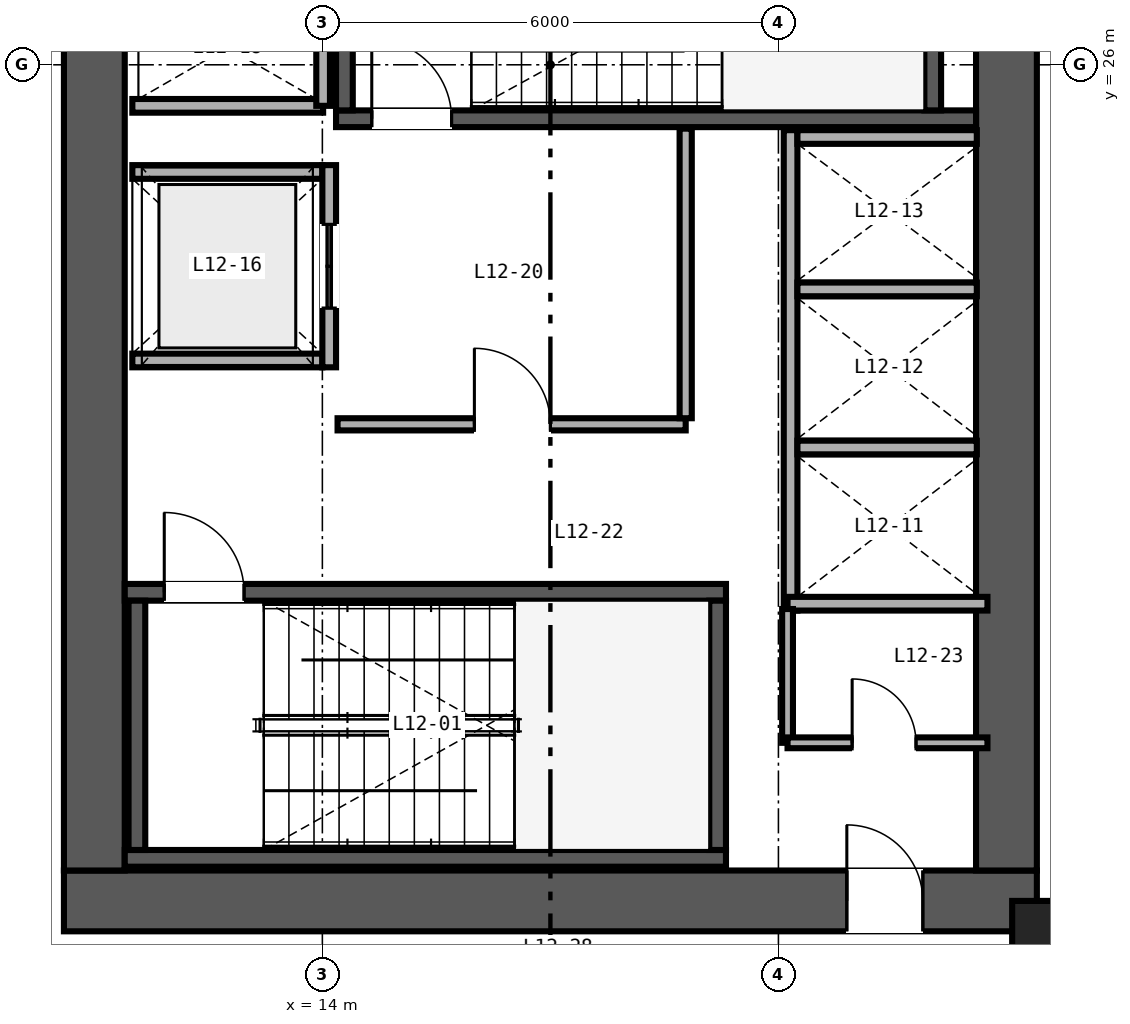
"""IFC4 building model, lengths in metres.
Left out: names, types, materials, properties, quantities, classifications, styles, units other than length and angle.
Written with IfcOpenShell. Run it as: python <this file> out.ifc"""

import sys

from ifc_helpers import new_model, si_unit, direction, frame, frame_2d, origin, origin_2d, place, context, subcontext, project, spatial, rectangle, hollow_rectangle, extrude, source, transform, mapped, element, fill, save


model = new_model("IFC4")
c1 = context("Model", 3, precision=1e-05, world=origin(), true_north=direction((0.0, 1.0)))
c2 = subcontext(c1, "Body", "Model", "MODEL_VIEW")
j1 = project(units=[si_unit("LENGTHUNIT", "METRE"), si_unit("PLANEANGLEUNIT", "RADIAN")], contexts=[c1])
p1 = place(None, origin())
s1 = spatial("IfcSite", under=j1, at=p1, CompositionType="ELEMENT")
p2 = place(p1, origin())
s2 = spatial("IfcBuilding", under=s1, at=p2, CompositionType="ELEMENT")
p3 = place(p2, frame((0.0, 0.0, 52.8)))
s3 = spatial("IfcBuildingStorey", under=s2, at=p3, CompositionType="ELEMENT", Elevation=52.8)
p4 = place(p3, frame((10.6, 15.0, 0.0), z_axis=(0.0, 0.0, 1.0), x_axis=(1.0, 0.0, 0.0)))
e1 = element("IfcWall", 1, at=p4, inside=s3, PredefinedType="SHEAR", context=c2, shape_type="SweptSolid", body=[
    extrude(rectangle(XDim=12.8, YDim=0.8, at=frame_2d((6.4, 0.0))), origin(), (0.0, 0.0, 1.0), 3.35),
])
p5 = place(p4, frame((10.3, 0.0, 0.0)))
e2 = element("IfcOpeningElement", 2, at=p5, cuts=e1, PredefinedType="OPENING", context=c2, shape_type="SweptSolid", body=[
    extrude(rectangle(XDim=1.0, YDim=2.15, at=frame_2d((0.5, 1.075))), frame((0.0, 0.41, 0.0), z_axis=(0.0, -1.0, 0.0), x_axis=(1.0, 0.0, 0.0)), (0.0, 0.0, 1.0), 0.82),
])
for number, where, z_axis, x_axis in (
    (3, (11.0, 15.4, 0.0), (0.0, 0.0, 1.0), (0.0, 1.0, 0.0)),
    (4, (23.0, 15.4, 0.0), (0.0, 0.0, 1.0), (0.0, 1.0, 0.0)),
):
    element("IfcWall", number, at=place(p3, frame(where, z_axis=z_axis, x_axis=x_axis)), inside=s3, PredefinedType="SHEAR", context=c2, shape_type="SweptSolid", body=[
        extrude(rectangle(XDim=21.2, YDim=0.8, at=frame_2d((10.6, 0.0))), origin(), (0.0, 0.0, 1.0), 3.35),
    ])
p6 = place(p3, frame((11.4, 15.56, 0.0), z_axis=(0.0, 0.0, 1.0), x_axis=(1.0, 0.0, 0.0)))
e5 = element("IfcWall", 5, at=p6, inside=s3, PredefinedType="SHEAR", context=c2, shape_type="SweptSolid", body=[
    extrude(rectangle(XDim=7.91, YDim=0.22, at=frame_2d((3.955, 0.0))), origin(), (0.0, 0.0, 1.0), 3.4),
])
p7 = place(p3, frame((11.4, 19.06, 0.0), z_axis=(0.0, 0.0, 1.0), x_axis=(1.0, 0.0, 0.0)))
e6 = element("IfcWall", 6, at=p7, inside=s3, PredefinedType="SHEAR", context=c2, shape_type="SweptSolid", body=[
    extrude(rectangle(XDim=7.91, YDim=0.22, at=frame_2d((3.955, 0.0))), origin(), (0.0, 0.0, 1.0), 3.4),
])
p8 = place(p7, frame((0.52, 0.0, 0.0)))
e7 = element("IfcOpeningElement", 7, at=p8, cuts=e6, PredefinedType="OPENING", context=c2, shape_type="SweptSolid", body=[
    extrude(rectangle(XDim=1.05, YDim=2.15, at=frame_2d((0.525, 1.075))), frame((0.0, 0.12, 0.0), z_axis=(0.0, -1.0, 0.0), x_axis=(1.0, 0.0, 0.0)), (0.0, 0.0, 1.0), 0.24),
])
for number, where, z_axis, x_axis in (
    (8, (11.56, 15.67, 0.0), (0.0, 0.0, 1.0), (0.0, 1.0, 0.0)),
    (9, (19.2, 15.67, 0.0), (0.0, 0.0, 1.0), (0.0, 1.0, 0.0)),
):
    element("IfcWall", number, at=place(p3, frame(where, z_axis=z_axis, x_axis=x_axis)), inside=s3, PredefinedType="SHEAR", context=c2, shape_type="SweptSolid", body=[
        extrude(rectangle(XDim=3.28, YDim=0.22, at=frame_2d((1.64, 0.0))), origin(), (0.0, 0.0, 1.0), 3.4),
    ])
p9 = place(p3, frame((14.18, 25.29, 0.0), z_axis=(0.0, 0.0, 1.0), x_axis=(1.0, 0.0, 0.0)))
e10 = element("IfcWall", 10, at=p9, inside=s3, PredefinedType="SHEAR", context=c2, shape_type="SweptSolid", body=[
    extrude(rectangle(XDim=8.42, YDim=0.22, at=frame_2d((4.21, 0.0))), origin(), (0.0, 0.0, 1.0), 3.4),
])
p10 = place(p9, frame((0.47, 0.0, 0.0)))
e11 = element("IfcOpeningElement", 11, at=p10, cuts=e10, PredefinedType="OPENING", context=c2, shape_type="SweptSolid", body=[
    extrude(rectangle(XDim=1.05, YDim=2.15, at=frame_2d((0.525, 1.075))), frame((0.0, 0.12, 0.0), z_axis=(0.0, -1.0, 0.0), x_axis=(1.0, 0.0, 0.0)), (0.0, 0.0, 1.0), 0.24),
])
for number, where, z_axis, x_axis in (
    (12, (14.29, 25.4, 0.0), (0.0, 0.0, 1.0), (0.0, 1.0, 0.0)),
    (13, (22.03, 25.4, 0.0), (0.0, 0.0, 1.0), (0.0, 1.0, 0.0)),
):
    element("IfcWall", number, at=place(p3, frame(where, z_axis=z_axis, x_axis=x_axis)), inside=s3, PredefinedType="SHEAR", context=c2, shape_type="SweptSolid", body=[
        extrude(rectangle(XDim=3.28, YDim=0.22, at=frame_2d((1.64, 0.0))), origin(), (0.0, 0.0, 1.0), 3.4),
    ])
m1 = source(origin(), c2, "Body", "SweptSolid", [
    extrude(hollow_rectangle(XDim=0.85, YDim=0.9, WallThickness=0.04, at=origin_2d()), origin(), (0.0, 0.0, 1.0), 3.35),
])
p11 = place(p3, frame((23.5, 14.55, 0.0), z_axis=(0.0, 0.0, 1.0), x_axis=(1.0, 0.0, 0.0)))
e14 = element("IfcColumn", 14, at=p11, inside=s3, PredefinedType="COLUMN", context=c2, shape_type="MappedRepresentation", body=[
    mapped(m1, transform((0.0, 0.0, 0.0), scale=1.0)),
])
p12 = place(p3, frame((20.16, 18.82, 0.0), z_axis=(0.0, 0.0, 1.0), x_axis=(0.0, 1.0, 0.0)))
e15 = element("IfcWall", 15, at=p12, inside=s3, PredefinedType="SOLIDWALL", context=c2, shape_type="SweptSolid", body=[
    extrude(rectangle(XDim=6.32, YDim=0.18, at=frame_2d((3.16, 0.0))), origin(), (0.0, 0.0, 1.0), 2.36),
])
p13 = place(p3, frame((20.12, 18.91, 0.0), z_axis=(0.0, 0.0, 1.0), x_axis=(1.0, 0.0, 0.0)))
e16 = element("IfcWall", 16, at=p13, inside=s3, PredefinedType="SOLIDWALL", context=c2, shape_type="SweptSolid", body=[
    extrude(rectangle(XDim=2.63, YDim=0.18, at=frame_2d((1.315, 0.0))), origin(), (0.0, 0.0, 1.0), 3.35),
])
p14 = place(p3, frame((20.25, 25.05, 0.0), z_axis=(0.0, 0.0, 1.0), x_axis=(1.0, 0.0, 0.0)))
e17 = element("IfcWall", 17, at=p14, inside=s3, PredefinedType="SOLIDWALL", context=c2, shape_type="SweptSolid", body=[
    extrude(rectangle(XDim=2.36, YDim=0.18, at=frame_2d((1.18, 0.0))), origin(), (0.0, 0.0, 1.0), 3.35),
])
p15 = place(p3, frame((20.25, 20.965, 0.0), z_axis=(0.0, 0.0, 1.0), x_axis=(1.0, 0.0, 0.0)))
e18 = element("IfcWall", 18, at=p15, inside=s3, PredefinedType="SOLIDWALL", context=c2, shape_type="SweptSolid", body=[
    extrude(rectangle(XDim=2.36, YDim=0.18, at=frame_2d((1.18, 0.0))), origin(), (0.0, 0.0, 1.0), 2.36),
])
p16 = place(p3, frame((20.25, 23.045, 0.0), z_axis=(0.0, 0.0, 1.0), x_axis=(1.0, 0.0, 0.0)))
e19 = element("IfcWall", 19, at=p16, inside=s3, PredefinedType="SOLIDWALL", context=c2, shape_type="SweptSolid", body=[
    extrude(rectangle(XDim=2.36, YDim=0.18, at=frame_2d((1.18, 0.0))), origin(), (0.0, 0.0, 1.0), 3.35),
])
for number, where, z_axis, x_axis in (
    (20, (11.5, 22.11, 0.0), (0.0, 0.0, 1.0), (1.0, 0.0, 0.0)),
    (21, (11.5, 24.59, 0.0), (0.0, 0.0, 1.0), (1.0, 0.0, 0.0)),
):
    element("IfcWall", number, at=place(p3, frame(where, z_axis=z_axis, x_axis=x_axis)), inside=s3, PredefinedType="SOLIDWALL", context=c2, shape_type="SweptSolid", body=[
        extrude(rectangle(XDim=2.5, YDim=0.18, at=frame_2d((1.25, 0.0))), origin(), (0.0, 0.0, 1.0), 3.35),
    ])
p17 = place(p3, frame((14.09, 22.02, 0.0), z_axis=(0.0, 0.0, 1.0), x_axis=(0.0, 1.0, 0.0)))
e22 = element("IfcWall", 22, at=p17, inside=s3, PredefinedType="SOLIDWALL", context=c2, shape_type="SweptSolid", body=[
    extrude(rectangle(XDim=2.66, YDim=0.18, at=frame_2d((1.33, 0.0))), origin(), (0.0, 0.0, 1.0), 3.35),
])
p18 = place(p17, frame((0.78, 0.0, 0.0)))
e23 = element("IfcOpeningElement", 23, at=p18, cuts=e22, PredefinedType="OPENING", context=c2, shape_type="SweptSolid", body=[
    extrude(rectangle(XDim=1.1, YDim=2.2, at=frame_2d((0.55, 1.1))), frame((0.0, 0.1, 0.0), z_axis=(0.0, -1.0, 0.0), x_axis=(1.0, 0.0, 0.0)), (0.0, 0.0, 1.0), 0.2),
])
p19 = place(p3, frame((11.5, 25.46, 0.0), z_axis=(0.0, 0.0, 1.0), x_axis=(1.0, 0.0, 0.0)))
e24 = element("IfcWall", 24, at=p19, inside=s3, PredefinedType="SOLIDWALL", context=c2, shape_type="SweptSolid", body=[
    extrude(rectangle(XDim=2.51, YDim=0.18, at=frame_2d((1.255, 0.0))), origin(), (0.0, 0.0, 1.0), 3.35),
])
p20 = place(p3, frame((14.01, 25.46, 0.0), z_axis=(0.0, 0.0, 1.0), x_axis=(0.0, 1.0, 0.0)))
e25 = element("IfcWall", 25, at=p20, inside=s3, PredefinedType="SOLIDWALL", context=c2, shape_type="SweptSolid", body=[
    extrude(rectangle(XDim=3.08, YDim=0.18, at=frame_2d((1.54, 0.0))), origin(), (0.0, 0.0, 1.0), 3.35),
])
p21 = place(p3, frame((14.2, 21.27, 0.0), z_axis=(0.0, 0.0, 1.0), x_axis=(1.0, 0.0, 0.0)))
e26 = element("IfcWall", 26, at=p21, inside=s3, PredefinedType="PARTITIONING", context=c2, shape_type="SweptSolid", body=[
    extrude(rectangle(XDim=4.58, YDim=0.16, at=frame_2d((2.29, 0.0))), origin(), (0.0, 0.0, 1.0), 3.35),
])
p22 = place(p21, frame((1.8, 0.0, 0.0)))
e27 = element("IfcOpeningElement", 27, at=p22, cuts=e26, PredefinedType="OPENING", context=c2, shape_type="SweptSolid", body=[
    extrude(rectangle(XDim=1.0, YDim=2.15, at=frame_2d((0.5, 1.075))), frame((0.0, 0.09, 0.0), z_axis=(0.0, -1.0, 0.0), x_axis=(1.0, 0.0, 0.0)), (0.0, 0.0, 1.0), 0.18),
])
p23 = place(p3, frame((18.78, 21.35, 0.0), z_axis=(0.0, 0.0, 1.0), x_axis=(0.0, 1.0, 0.0)))
e28 = element("IfcWall", 28, at=p23, inside=s3, PredefinedType="PARTITIONING", context=c2, shape_type="SweptSolid", body=[
    extrude(rectangle(XDim=3.81, YDim=0.16, at=frame_2d((1.905, 0.0))), origin(), (0.0, 0.0, 1.0), 3.35),
])
p24 = place(p3, frame((20.12, 17.08, 0.0), z_axis=(0.0, 0.0, 1.0), x_axis=(0.0, 1.0, 0.0)))
e29 = element("IfcWall", 29, at=p24, inside=s3, PredefinedType="PARTITIONING", context=c2, shape_type="SweptSolid", body=[
    extrude(rectangle(XDim=1.76, YDim=0.142, at=frame_2d((0.88, 0.0))), origin(), (0.0, 0.0, 1.0), 3.35),
])
p25 = place(p3, frame((20.12, 17.08, 0.0), z_axis=(0.0, 0.0, 1.0), x_axis=(1.0, 0.0, 0.0)))
e30 = element("IfcWall", 30, at=p25, inside=s3, PredefinedType="PARTITIONING", context=c2, shape_type="SweptSolid", body=[
    extrude(rectangle(XDim=2.63, YDim=0.142, at=frame_2d((1.315, 0.0))), origin(), (0.0, 0.0, 1.0), 3.35),
])
p26 = place(p25, frame((0.85, 0.0, 0.0)))
e31 = element("IfcOpeningElement", 31, at=p26, cuts=e30, PredefinedType="OPENING", context=c2, shape_type="SweptSolid", body=[
    extrude(rectangle(XDim=0.84, YDim=2.1, at=frame_2d((0.42, 1.05))), frame((0.0, 0.081, 0.0), z_axis=(0.0, -1.0, 0.0), x_axis=(1.0, 0.0, 0.0)), (0.0, 0.0, 1.0), 0.162),
])
m2 = source(origin(), c2, "Body", "SweptSolid", [
    extrude(rectangle(XDim=1.05, YDim=2.15, at=frame_2d((0.525, 1.075))), frame((0.0, 0.025, 0.0), z_axis=(0.0, -1.0, 0.0), x_axis=(1.0, 0.0, 0.0)), (0.0, 0.0, 1.0), 0.05),
])
p27 = place(p8, origin())
e32 = element("IfcDoor", 32, at=p27, inside=s3, OperationType="SINGLE_SWING_LEFT", PredefinedType="DOOR", context=c2, shape_type="MappedRepresentation", body=[
    mapped(m2, transform((0.0, 0.0, 0.0), scale=1.0)),
])
fill(e7, e32)
p28 = place(p10, origin())
e33 = element("IfcDoor", 33, at=p28, inside=s3, OperationType="SINGLE_SWING_LEFT", PredefinedType="DOOR", context=c2, shape_type="MappedRepresentation", body=[
    mapped(m2, transform((0.0, 0.0, 0.0), scale=1.0)),
])
fill(e11, e33)
m3 = source(origin(), c2, "Body", "SweptSolid", [
    extrude(rectangle(XDim=1.1, YDim=2.2, at=frame_2d((0.55, 1.1))), frame((0.0, 0.025, 0.0), z_axis=(0.0, -1.0, 0.0), x_axis=(1.0, 0.0, 0.0)), (0.0, 0.0, 1.0), 0.05),
])
p29 = place(p18, origin())
e34 = element("IfcDoor", 34, at=p29, inside=s3, OperationType="DOUBLE_DOOR_SLIDING", PredefinedType="DOOR", context=c2, shape_type="MappedRepresentation", body=[
    mapped(m3, transform((0.0, 0.0, 0.0), scale=1.0)),
])
fill(e23, e34)
m4 = source(origin(), c2, "Body", "SweptSolid", [
    extrude(rectangle(XDim=1.0, YDim=2.15, at=frame_2d((0.5, 1.075))), frame((0.0, 0.025, 0.0), z_axis=(0.0, -1.0, 0.0), x_axis=(1.0, 0.0, 0.0)), (0.0, 0.0, 1.0), 0.05),
])
p30 = place(p22, origin())
e35 = element("IfcDoor", 35, at=p30, inside=s3, OperationType="SINGLE_SWING_LEFT", PredefinedType="DOOR", context=c2, shape_type="MappedRepresentation", body=[
    mapped(m4, transform((0.0, 0.0, 0.0), scale=1.0)),
])
fill(e27, e35)
m5 = source(origin(), c2, "Body", "SweptSolid", [
    extrude(rectangle(XDim=0.84, YDim=2.1, at=frame_2d((0.42, 1.05))), frame((0.0, 0.025, 0.0), z_axis=(0.0, -1.0, 0.0), x_axis=(1.0, 0.0, 0.0)), (0.0, 0.0, 1.0), 0.05),
])
p31 = place(p26, origin())
e36 = element("IfcDoor", 36, at=p31, inside=s3, OperationType="SINGLE_SWING_LEFT", PredefinedType="DOOR", context=c2, shape_type="MappedRepresentation", body=[
    mapped(m5, transform((0.0, 0.0, 0.0), scale=1.0)),
])
fill(e31, e36)
p32 = place(p5, origin())
e37 = element("IfcDoor", 37, at=p32, inside=s3, OperationType="SINGLE_SWING_LEFT", PredefinedType="DOOR", context=c2, shape_type="MappedRepresentation", body=[
    mapped(m4, transform((0.0, 0.0, 0.0), scale=1.0)),
])
fill(e2, e37)
save(model, sys.argv[1])
